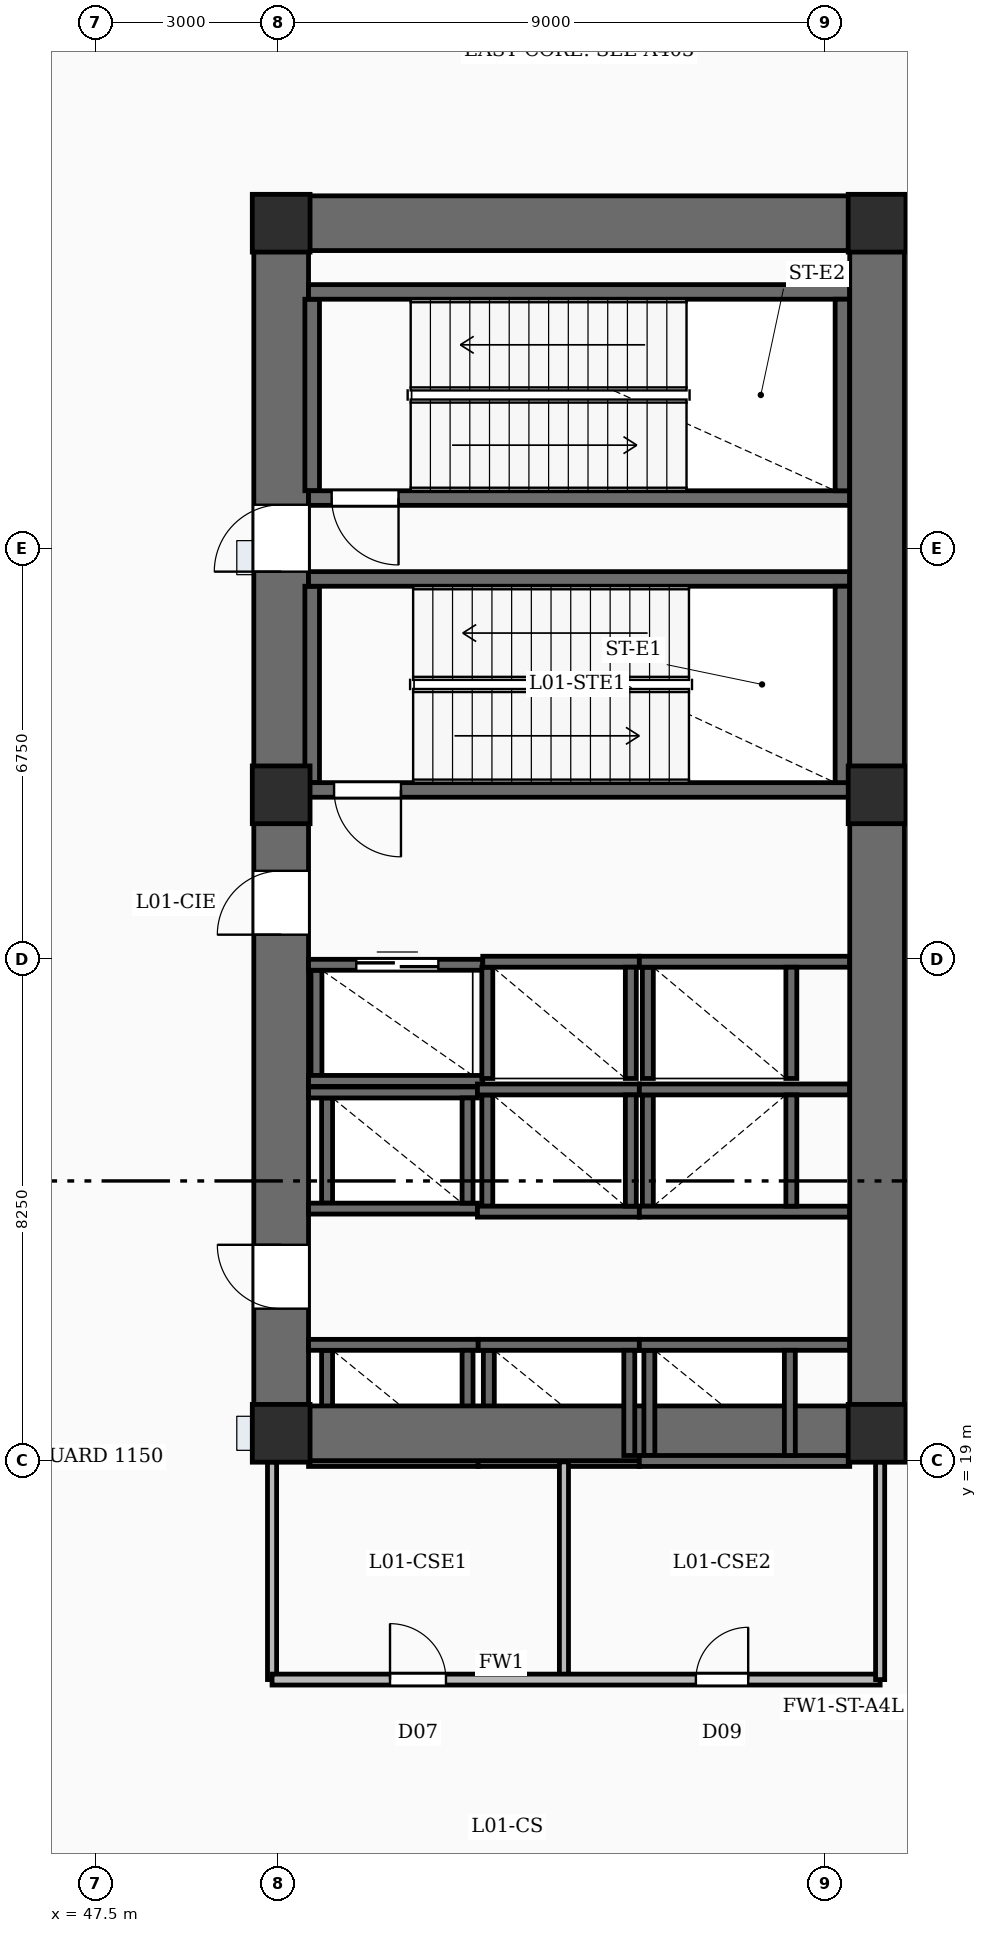
"""IFC4 building model, lengths in metres.
Left out: names, types, materials, properties, quantities, classifications, styles, units other than length and angle.
Written with IfcOpenShell. Run it as: python <this file> out.ifc"""

import sys

from ifc_helpers import new_model, si_unit, direction, frame, frame_2d, origin, origin_2d, place, context, subcontext, project, spatial, rectangle, extrude, element, fill, save


model = new_model("IFC4")
c1 = context("Model", 3, precision=1e-05, world=origin(), true_north=direction((0.0, 1.0)))
c2 = subcontext(c1, "Body", "Model", "MODEL_VIEW")
j1 = project(units=[si_unit("LENGTHUNIT", "METRE"), si_unit("PLANEANGLEUNIT", "RADIAN")], contexts=[c1])
p1 = place(None, origin())
s1 = spatial("IfcSite", under=j1, at=p1, CompositionType="ELEMENT")
p2 = place(p1, origin())
s2 = spatial("IfcBuilding", under=s1, at=p2, CompositionType="ELEMENT")
p3 = place(p2, frame((0.0, 0.0, 8.0)))
s3 = spatial("IfcBuildingStorey", under=s2, at=p3, CompositionType="ELEMENT", Elevation=8.0)
p4 = place(p3, frame((50.55, 19.0, -0.35), z_axis=(0.0, 0.0, 1.0), x_axis=(0.0, 1.0, 0.0)))
e1 = element("IfcWall", 1, at=p4, inside=s3, PredefinedType="SHEAR", context=c2, shape_type="SweptSolid", body=[
    extrude(rectangle(XDim=20.8, YDim=0.9, at=frame_2d((10.4, 0.0))), origin(), (0.0, 0.0, 1.0), 5.0),
])
p5 = place(p4, frame((2.5, 0.0, 0.35)))
e2 = element("IfcOpeningElement", 2, at=p5, cuts=e1, PredefinedType="OPENING", context=c2, shape_type="SweptSolid", body=[
    extrude(rectangle(XDim=1.05, YDim=2.15, at=frame_2d((0.525, 1.075))), frame((0.0, 0.46, 0.0), z_axis=(0.0, -1.0, 0.0), x_axis=(1.0, 0.0, 0.0)), (0.0, 0.0, 1.0), 0.92),
])
p6 = place(p4, frame((8.65, 0.0, 0.35)))
e3 = element("IfcOpeningElement", 3, at=p6, cuts=e1, PredefinedType="OPENING", context=c2, shape_type="SweptSolid", body=[
    extrude(rectangle(XDim=1.05, YDim=2.15, at=frame_2d((0.525, 1.075))), frame((0.0, 0.46, 0.0), z_axis=(0.0, -1.0, 0.0), x_axis=(1.0, 0.0, 0.0)), (0.0, 0.0, 1.0), 0.92),
])
p7 = place(p4, frame((14.62, 0.0, 0.35)))
e4 = element("IfcOpeningElement", 4, at=p7, cuts=e1, PredefinedType="OPENING", context=c2, shape_type="SweptSolid", body=[
    extrude(rectangle(XDim=1.1, YDim=2.15, at=frame_2d((0.55, 1.075))), frame((0.0, 0.46, 0.0), z_axis=(0.0, -1.0, 0.0), x_axis=(1.0, 0.0, 0.0)), (0.0, 0.0, 1.0), 0.92),
])
p8 = place(p3, frame((60.35, 19.0, -0.35), z_axis=(0.0, 0.0, 1.0), x_axis=(0.0, 1.0, 0.0)))
e5 = element("IfcWall", 5, at=p8, inside=s3, PredefinedType="SHEAR", context=c2, shape_type="SweptSolid", body=[
    extrude(rectangle(XDim=20.8, YDim=0.9, at=frame_2d((10.4, 0.0))), origin(), (0.0, 0.0, 1.0), 5.0),
])
for number, where, z_axis, x_axis in (
    (6, (51.0, 19.45, -0.35), (0.0, 0.0, 1.0), (1.0, 0.0, 0.0)),
    (7, (51.0, 39.35, -0.35), (0.0, 0.0, 1.0), (1.0, 0.0, 0.0)),
):
    element("IfcWall", number, at=place(p3, frame(where, z_axis=z_axis, x_axis=x_axis)), inside=s3, PredefinedType="SHEAR", context=c2, shape_type="SweptSolid", body=[
        extrude(rectangle(XDim=8.9, YDim=0.9, at=frame_2d((4.45, 0.0))), origin(), (0.0, 0.0, 1.0), 5.0),
    ])
for number, where, z_axis, x_axis in (
    (8, (50.55, 19.45, -0.35), (0.0, 0.0, 1.0), (1.0, 0.0, 0.0)),
    (9, (60.35, 19.45, -0.35), (0.0, 0.0, 1.0), (1.0, 0.0, 0.0)),
    (10, (50.55, 29.95, -0.35), (0.0, 0.0, 1.0), (1.0, 0.0, 0.0)),
    (11, (60.35, 29.95, -0.35), (0.0, 0.0, 1.0), (1.0, 0.0, 0.0)),
    (12, (50.55, 39.35, -0.35), (0.0, 0.0, 1.0), (1.0, 0.0, 0.0)),
    (13, (60.35, 39.35, -0.35), (0.0, 0.0, 1.0), (1.0, 0.0, 0.0)),
):
    element("IfcColumn", number, at=place(p3, frame(where, z_axis=z_axis, x_axis=x_axis)), inside=s3, PredefinedType="COLUMN", context=c2, shape_type="SweptSolid", body=[
        extrude(rectangle(XDim=0.95, YDim=0.95, at=origin_2d()), origin(), (0.0, 0.0, 1.0), 5.0),
    ])
p9 = place(p3, frame((59.9, 30.03, 0.0), z_axis=(0.0, 0.0, 1.0), x_axis=(-1.0, 0.0, 0.0)))
e14 = element("IfcWall", 14, at=p9, inside=s3, PredefinedType="SOLIDWALL", context=c2, shape_type="SweptSolid", body=[
    extrude(rectangle(XDim=8.9, YDim=0.24, at=frame_2d((4.45, 0.0))), origin(), (0.0, 0.0, 1.0), 4.65),
])
p10 = place(p9, frame((7.38, 0.0, 0.0)))
e15 = element("IfcOpeningElement", 15, at=p10, cuts=e14, PredefinedType="OPENING", context=c2, shape_type="SweptSolid", body=[
    extrude(rectangle(XDim=1.1, YDim=2.15, at=frame_2d((0.55, 1.075))), frame((0.0, 0.13, 0.0), z_axis=(0.0, -1.0, 0.0), x_axis=(1.0, 0.0, 0.0)), (0.0, 0.0, 1.0), 0.26),
])
p11 = place(p3, frame((51.0, 33.5, 0.0), z_axis=(0.0, 0.0, 1.0), x_axis=(1.0, 0.0, 0.0)))
e16 = element("IfcWall", 16, at=p11, inside=s3, PredefinedType="SOLIDWALL", context=c2, shape_type="SweptSolid", body=[
    extrude(rectangle(XDim=8.9, YDim=0.24, at=frame_2d((4.45, 0.0))), origin(), (0.0, 0.0, 1.0), 4.65),
])
for number, where, z_axis, x_axis in (
    (17, (51.06, 30.15, 0.0), (0.0, 0.0, 1.0), (0.0, 1.0, 0.0)),
    (18, (59.78, 30.15, 0.0), (0.0, 0.0, 1.0), (0.0, 1.0, 0.0)),
):
    element("IfcWall", number, at=place(p3, frame(where, z_axis=z_axis, x_axis=x_axis)), inside=s3, PredefinedType="SOLIDWALL", context=c2, shape_type="SweptSolid", body=[
        extrude(rectangle(XDim=3.23, YDim=0.24, at=frame_2d((1.615, 0.0))), origin(), (0.0, 0.0, 1.0), 4.65),
    ])
p12 = place(p3, frame((59.9, 34.83, 0.0), z_axis=(0.0, 0.0, 1.0), x_axis=(-1.0, 0.0, 0.0)))
e19 = element("IfcWall", 19, at=p12, inside=s3, PredefinedType="SOLIDWALL", context=c2, shape_type="SweptSolid", body=[
    extrude(rectangle(XDim=8.9, YDim=0.24, at=frame_2d((4.45, 0.0))), origin(), (0.0, 0.0, 1.0), 4.65),
])
p13 = place(p12, frame((7.42, 0.0, 0.0)))
e20 = element("IfcOpeningElement", 20, at=p13, cuts=e19, PredefinedType="OPENING", context=c2, shape_type="SweptSolid", body=[
    extrude(rectangle(XDim=1.1, YDim=2.15, at=frame_2d((0.55, 1.075))), frame((0.0, 0.13, 0.0), z_axis=(0.0, -1.0, 0.0), x_axis=(1.0, 0.0, 0.0)), (0.0, 0.0, 1.0), 0.26),
])
p14 = place(p3, frame((51.0, 38.22, 0.0), z_axis=(0.0, 0.0, 1.0), x_axis=(1.0, 0.0, 0.0)))
e21 = element("IfcWall", 21, at=p14, inside=s3, PredefinedType="SOLIDWALL", context=c2, shape_type="SweptSolid", body=[
    extrude(rectangle(XDim=8.9, YDim=0.24, at=frame_2d((4.45, 0.0))), origin(), (0.0, 0.0, 1.0), 4.65),
])
for number, where, z_axis, x_axis in (
    (22, (51.06, 34.95, 0.0), (0.0, 0.0, 1.0), (0.0, 1.0, 0.0)),
    (23, (59.78, 34.95, 0.0), (0.0, 0.0, 1.0), (0.0, 1.0, 0.0)),
):
    element("IfcWall", number, at=place(p3, frame(where, z_axis=z_axis, x_axis=x_axis)), inside=s3, PredefinedType="SOLIDWALL", context=c2, shape_type="SweptSolid", body=[
        extrude(rectangle(XDim=3.15, YDim=0.24, at=frame_2d((1.575, 0.0))), origin(), (0.0, 0.0, 1.0), 4.65),
    ])
for number, where, z_axis, x_axis in (
    (24, (51.0, 20.905, 0.0), (0.0, 0.0, 1.0), (1.0, 0.0, 0.0)),
    (25, (51.0, 18.995, 0.0), (0.0, 0.0, 1.0), (1.0, 0.0, 0.0)),
):
    element("IfcWall", number, at=place(p3, frame(where, z_axis=z_axis, x_axis=x_axis)), inside=s3, PredefinedType="SOLIDWALL", context=c2, shape_type="SweptSolid", body=[
        extrude(rectangle(XDim=2.79, YDim=0.18, at=frame_2d((1.395, 0.0))), origin(), (0.0, 0.0, 1.0), 4.65),
    ])
for number, where, z_axis, x_axis in (
    (26, (51.305, 19.085, 0.0), (0.0, 0.0, 1.0), (0.0, 1.0, 0.0)),
    (27, (53.615, 19.085, 0.0), (0.0, 0.0, 1.0), (0.0, 1.0, 0.0)),
):
    element("IfcWall", number, at=place(p3, frame(where, z_axis=z_axis, x_axis=x_axis)), inside=s3, PredefinedType="SOLIDWALL", context=c2, shape_type="SweptSolid", body=[
        extrude(rectangle(XDim=1.73, YDim=0.18, at=frame_2d((0.865, 0.0))), origin(), (0.0, 0.0, 1.0), 4.65),
    ])
for number, where, z_axis, x_axis in (
    (28, (53.79, 20.905, 0.0), (0.0, 0.0, 1.0), (1.0, 0.0, 0.0)),
    (29, (53.79, 18.995, 0.0), (0.0, 0.0, 1.0), (1.0, 0.0, 0.0)),
):
    element("IfcWall", number, at=place(p3, frame(where, z_axis=z_axis, x_axis=x_axis)), inside=s3, PredefinedType="SOLIDWALL", context=c2, shape_type="SweptSolid", body=[
        extrude(rectangle(XDim=2.65, YDim=0.18, at=frame_2d((1.325, 0.0))), origin(), (0.0, 0.0, 1.0), 4.65),
    ])
for number, where, z_axis, x_axis in (
    (30, (53.965, 19.085, 0.0), (0.0, 0.0, 1.0), (0.0, 1.0, 0.0)),
    (31, (56.275, 19.085, 0.0), (0.0, 0.0, 1.0), (0.0, 1.0, 0.0)),
):
    element("IfcWall", number, at=place(p3, frame(where, z_axis=z_axis, x_axis=x_axis)), inside=s3, PredefinedType="SOLIDWALL", context=c2, shape_type="SweptSolid", body=[
        extrude(rectangle(XDim=1.73, YDim=0.18, at=frame_2d((0.865, 0.0))), origin(), (0.0, 0.0, 1.0), 4.65),
    ])
for number, where, z_axis, x_axis in (
    (32, (56.44, 20.905, 0.0), (0.0, 0.0, 1.0), (1.0, 0.0, 0.0)),
    (33, (56.44, 18.995, 0.0), (0.0, 0.0, 1.0), (1.0, 0.0, 0.0)),
):
    element("IfcWall", number, at=place(p3, frame(where, z_axis=z_axis, x_axis=x_axis)), inside=s3, PredefinedType="SOLIDWALL", context=c2, shape_type="SweptSolid", body=[
        extrude(rectangle(XDim=3.46, YDim=0.18, at=frame_2d((1.73, 0.0))), origin(), (0.0, 0.0, 1.0), 4.65),
    ])
for number, where, z_axis, x_axis in (
    (34, (56.605, 19.085, 0.0), (0.0, 0.0, 1.0), (0.0, 1.0, 0.0)),
    (35, (58.915, 19.085, 0.0), (0.0, 0.0, 1.0), (0.0, 1.0, 0.0)),
):
    element("IfcWall", number, at=place(p3, frame(where, z_axis=z_axis, x_axis=x_axis)), inside=s3, PredefinedType="SOLIDWALL", context=c2, shape_type="SweptSolid", body=[
        extrude(rectangle(XDim=1.73, YDim=0.18, at=frame_2d((0.865, 0.0))), origin(), (0.0, 0.0, 1.0), 4.65),
    ])
for number, where, z_axis, x_axis in (
    (36, (51.0, 25.055, 0.0), (0.0, 0.0, 1.0), (1.0, 0.0, 0.0)),
    (37, (51.0, 23.145, 0.0), (0.0, 0.0, 1.0), (1.0, 0.0, 0.0)),
):
    element("IfcWall", number, at=place(p3, frame(where, z_axis=z_axis, x_axis=x_axis)), inside=s3, PredefinedType="SOLIDWALL", context=c2, shape_type="SweptSolid", body=[
        extrude(rectangle(XDim=2.778, YDim=0.18, at=frame_2d((1.389, 0.0))), origin(), (0.0, 0.0, 1.0), 4.65),
    ])
for number, where, z_axis, x_axis in (
    (38, (51.305, 23.235, 0.0), (0.0, 0.0, 1.0), (0.0, 1.0, 0.0)),
    (39, (53.615, 23.235, 0.0), (0.0, 0.0, 1.0), (0.0, 1.0, 0.0)),
):
    element("IfcWall", number, at=place(p3, frame(where, z_axis=z_axis, x_axis=x_axis)), inside=s3, PredefinedType="SOLIDWALL", context=c2, shape_type="SweptSolid", body=[
        extrude(rectangle(XDim=1.73, YDim=0.18, at=frame_2d((0.865, 0.0))), origin(), (0.0, 0.0, 1.0), 4.65),
    ])
for number, where, z_axis, x_axis in (
    (40, (53.778, 25.105, 0.0), (0.0, 0.0, 1.0), (1.0, 0.0, 0.0)),
    (41, (53.778, 23.095, 0.0), (0.0, 0.0, 1.0), (1.0, 0.0, 0.0)),
):
    element("IfcWall", number, at=place(p3, frame(where, z_axis=z_axis, x_axis=x_axis)), inside=s3, PredefinedType="SOLIDWALL", context=c2, shape_type="SweptSolid", body=[
        extrude(rectangle(XDim=2.662, YDim=0.18, at=frame_2d((1.331, 0.0))), origin(), (0.0, 0.0, 1.0), 4.65),
    ])
for number, where, z_axis, x_axis in (
    (42, (53.94, 23.185, 0.0), (0.0, 0.0, 1.0), (0.0, 1.0, 0.0)),
    (43, (56.3, 23.185, 0.0), (0.0, 0.0, 1.0), (0.0, 1.0, 0.0)),
):
    element("IfcWall", number, at=place(p3, frame(where, z_axis=z_axis, x_axis=x_axis)), inside=s3, PredefinedType="SOLIDWALL", context=c2, shape_type="SweptSolid", body=[
        extrude(rectangle(XDim=1.83, YDim=0.18, at=frame_2d((0.915, 0.0))), origin(), (0.0, 0.0, 1.0), 4.65),
    ])
for number, where, z_axis, x_axis in (
    (44, (56.44, 25.105, 0.0), (0.0, 0.0, 1.0), (1.0, 0.0, 0.0)),
    (45, (56.44, 23.095, 0.0), (0.0, 0.0, 1.0), (1.0, 0.0, 0.0)),
):
    element("IfcWall", number, at=place(p3, frame(where, z_axis=z_axis, x_axis=x_axis)), inside=s3, PredefinedType="SOLIDWALL", context=c2, shape_type="SweptSolid", body=[
        extrude(rectangle(XDim=3.46, YDim=0.18, at=frame_2d((1.73, 0.0))), origin(), (0.0, 0.0, 1.0), 4.65),
    ])
for number, where, z_axis, x_axis in (
    (46, (56.58, 23.185, 0.0), (0.0, 0.0, 1.0), (0.0, 1.0, 0.0)),
    (47, (58.94, 23.185, 0.0), (0.0, 0.0, 1.0), (0.0, 1.0, 0.0)),
):
    element("IfcWall", number, at=place(p3, frame(where, z_axis=z_axis, x_axis=x_axis)), inside=s3, PredefinedType="SOLIDWALL", context=c2, shape_type="SweptSolid", body=[
        extrude(rectangle(XDim=1.83, YDim=0.18, at=frame_2d((0.915, 0.0))), origin(), (0.0, 0.0, 1.0), 4.65),
    ])
p15 = place(p3, frame((53.865, 27.205, 0.0), z_axis=(0.0, 0.0, 1.0), x_axis=(1.0, 0.0, 0.0)))
e48 = element("IfcWall", 48, at=p15, inside=s3, PredefinedType="SOLIDWALL", context=c2, shape_type="SweptSolid", body=[
    extrude(rectangle(XDim=2.575, YDim=0.18, at=frame_2d((1.288, 0.0))), origin(), (0.0, 0.0, 1.0), 4.65),
])
for number, where, z_axis, x_axis in (
    (49, (53.94, 25.285, 0.0), (0.0, 0.0, 1.0), (0.0, 1.0, 0.0)),
    (50, (56.3, 25.285, 0.0), (0.0, 0.0, 1.0), (0.0, 1.0, 0.0)),
):
    element("IfcWall", number, at=place(p3, frame(where, z_axis=z_axis, x_axis=x_axis)), inside=s3, PredefinedType="SOLIDWALL", context=c2, shape_type="SweptSolid", body=[
        extrude(rectangle(XDim=1.83, YDim=0.18, at=frame_2d((0.915, 0.0))), origin(), (0.0, 0.0, 1.0), 4.65),
    ])
p16 = place(p3, frame((56.44, 27.205, 0.0), z_axis=(0.0, 0.0, 1.0), x_axis=(1.0, 0.0, 0.0)))
e51 = element("IfcWall", 51, at=p16, inside=s3, PredefinedType="SOLIDWALL", context=c2, shape_type="SweptSolid", body=[
    extrude(rectangle(XDim=3.46, YDim=0.18, at=frame_2d((1.73, 0.0))), origin(), (0.0, 0.0, 1.0), 4.65),
])
for number, where, z_axis, x_axis in (
    (52, (56.58, 25.285, 0.0), (0.0, 0.0, 1.0), (0.0, 1.0, 0.0)),
    (53, (58.94, 25.285, 0.0), (0.0, 0.0, 1.0), (0.0, 1.0, 0.0)),
):
    element("IfcWall", number, at=place(p3, frame(where, z_axis=z_axis, x_axis=x_axis)), inside=s3, PredefinedType="SOLIDWALL", context=c2, shape_type="SweptSolid", body=[
        extrude(rectangle(XDim=1.83, YDim=0.18, at=frame_2d((0.915, 0.0))), origin(), (0.0, 0.0, 1.0), 4.65),
    ])
p17 = place(p3, frame((51.0, 27.155, 0.0), z_axis=(0.0, 0.0, 1.0), x_axis=(1.0, 0.0, 0.0)))
e54 = element("IfcWall", 54, at=p17, inside=s3, PredefinedType="SOLIDWALL", context=c2, shape_type="SweptSolid", body=[
    extrude(rectangle(XDim=2.865, YDim=0.18, at=frame_2d((1.433, 0.0))), origin(), (0.0, 0.0, 1.0), 4.65),
])
p18 = place(p17, frame((0.785, 0.0, 0.0)))
e55 = element("IfcOpeningElement", 55, at=p18, cuts=e54, PredefinedType="OPENING", context=c2, shape_type="SweptSolid", body=[
    extrude(rectangle(XDim=1.35, YDim=2.3, at=frame_2d((0.675, 1.15))), frame((0.0, 0.1, 0.0), z_axis=(0.0, -1.0, 0.0), x_axis=(1.0, 0.0, 0.0)), (0.0, 0.0, 1.0), 0.2),
])
p19 = place(p3, frame((51.0, 25.245, 0.0), z_axis=(0.0, 0.0, 1.0), x_axis=(1.0, 0.0, 0.0)))
e56 = element("IfcWall", 56, at=p19, inside=s3, PredefinedType="SOLIDWALL", context=c2, shape_type="SweptSolid", body=[
    extrude(rectangle(XDim=2.865, YDim=0.18, at=frame_2d((1.433, 0.0))), origin(), (0.0, 0.0, 1.0), 4.65),
])
p20 = place(p3, frame((51.13, 25.335, 0.0), z_axis=(0.0, 0.0, 1.0), x_axis=(0.0, 1.0, 0.0)))
e57 = element("IfcWall", 57, at=p20, inside=s3, PredefinedType="SOLIDWALL", context=c2, shape_type="SweptSolid", body=[
    extrude(rectangle(XDim=1.73, YDim=0.18, at=frame_2d((0.865, 0.0))), origin(), (0.0, 0.0, 1.0), 4.65),
])
p21 = place(p3, frame((55.2, 15.4, 0.0), z_axis=(0.0, 0.0, 1.0), x_axis=(0.0, 1.0, 0.0)))
e58 = element("IfcWall", 58, at=p21, inside=s3, PredefinedType="PARTITIONING", context=c2, shape_type="SweptSolid", body=[
    extrude(rectangle(XDim=3.58, YDim=0.15, at=frame_2d((1.79, 0.0))), origin(), (0.0, 0.0, 1.0), 3.71),
])
p22 = place(p3, frame((50.4, 15.4, 0.0), z_axis=(0.0, 0.0, 1.0), x_axis=(1.0, 0.0, 0.0)))
e59 = element("IfcWall", 59, at=p22, inside=s3, PredefinedType="SOLIDWALL", context=c2, shape_type="SweptSolid", body=[
    extrude(rectangle(XDim=10.0, YDim=0.18, at=frame_2d((5.0, 0.0))), origin(), (0.0, 0.0, 1.0), 3.71),
])
p23 = place(p22, frame((1.94, 0.0, 0.0)))
e60 = element("IfcOpeningElement", 60, at=p23, cuts=e59, PredefinedType="OPENING", context=c2, shape_type="SweptSolid", body=[
    extrude(rectangle(XDim=0.92, YDim=2.1, at=frame_2d((0.46, 1.05))), frame((0.0, 0.1, 0.0), z_axis=(0.0, -1.0, 0.0), x_axis=(1.0, 0.0, 0.0)), (0.0, 0.0, 1.0), 0.2),
])
p24 = place(p22, frame((6.97, 0.0, 0.0)))
e61 = element("IfcOpeningElement", 61, at=p24, cuts=e59, PredefinedType="OPENING", context=c2, shape_type="SweptSolid", body=[
    extrude(rectangle(XDim=0.86, YDim=2.05, at=frame_2d((0.43, 1.025))), frame((0.0, 0.1, 0.0), z_axis=(0.0, -1.0, 0.0), x_axis=(1.0, 0.0, 0.0)), (0.0, 0.0, 1.0), 0.2),
])
for number, where, z_axis, x_axis in (
    (62, (50.4, 15.4, 0.0), (0.0, 0.0, 1.0), (0.0, 1.0, 0.0)),
    (63, (60.4, 15.4, 0.0), (0.0, 0.0, 1.0), (0.0, 1.0, 0.0)),
):
    element("IfcWall", number, at=place(p3, frame(where, z_axis=z_axis, x_axis=x_axis)), inside=s3, PredefinedType="PARTITIONING", context=c2, shape_type="SweptSolid", body=[
        extrude(rectangle(XDim=3.58, YDim=0.15, at=frame_2d((1.79, 0.0))), origin(), (0.0, 0.0, 1.0), 3.71),
    ])
p25 = place(p5, origin())
e64 = element("IfcDoor", 64, at=p25, inside=s3, OperationType="SINGLE_SWING_RIGHT", PredefinedType="DOOR", context=c2, shape_type="SweptSolid", body=[
    extrude(rectangle(XDim=1.05, YDim=2.15, at=frame_2d((0.525, 1.075))), frame((0.0, 0.025, 0.0), z_axis=(0.0, -1.0, 0.0), x_axis=(1.0, 0.0, 0.0)), (0.0, 0.0, 1.0), 0.05),
])
fill(e2, e64)
p26 = place(p6, origin())
e65 = element("IfcDoor", 65, at=p26, inside=s3, OperationType="SINGLE_SWING_LEFT", PredefinedType="DOOR", context=c2, shape_type="SweptSolid", body=[
    extrude(rectangle(XDim=1.05, YDim=2.15, at=frame_2d((0.525, 1.075))), frame((0.0, 0.025, 0.0), z_axis=(0.0, -1.0, 0.0), x_axis=(1.0, 0.0, 0.0)), (0.0, 0.0, 1.0), 0.05),
])
fill(e3, e65)
p27 = place(p7, origin())
e66 = element("IfcDoor", 66, at=p27, inside=s3, OperationType="SINGLE_SWING_LEFT", PredefinedType="DOOR", context=c2, shape_type="SweptSolid", body=[
    extrude(rectangle(XDim=1.1, YDim=2.15, at=frame_2d((0.55, 1.075))), frame((0.0, 0.025, 0.0), z_axis=(0.0, -1.0, 0.0), x_axis=(1.0, 0.0, 0.0)), (0.0, 0.0, 1.0), 0.05),
])
fill(e4, e66)
p28 = place(p10, origin())
e67 = element("IfcDoor", 67, at=p28, inside=s3, OperationType="SINGLE_SWING_LEFT", PredefinedType="DOOR", context=c2, shape_type="SweptSolid", body=[
    extrude(rectangle(XDim=1.1, YDim=2.15, at=frame_2d((0.55, 1.075))), frame((0.0, 0.025, 0.0), z_axis=(0.0, -1.0, 0.0), x_axis=(1.0, 0.0, 0.0)), (0.0, 0.0, 1.0), 0.05),
])
fill(e15, e67)
p29 = place(p13, origin())
e68 = element("IfcDoor", 68, at=p29, inside=s3, OperationType="SINGLE_SWING_LEFT", PredefinedType="DOOR", context=c2, shape_type="SweptSolid", body=[
    extrude(rectangle(XDim=1.1, YDim=2.15, at=frame_2d((0.55, 1.075))), frame((0.0, 0.025, 0.0), z_axis=(0.0, -1.0, 0.0), x_axis=(1.0, 0.0, 0.0)), (0.0, 0.0, 1.0), 0.05),
])
fill(e20, e68)
p30 = place(p18, origin())
e69 = element("IfcDoor", 69, at=p30, inside=s3, OperationType="DOUBLE_DOOR_SLIDING", PredefinedType="DOOR", context=c2, shape_type="SweptSolid", body=[
    extrude(rectangle(XDim=1.35, YDim=2.3, at=frame_2d((0.675, 1.15))), frame((0.0, 0.025, 0.0), z_axis=(0.0, -1.0, 0.0), x_axis=(1.0, 0.0, 0.0)), (0.0, 0.0, 1.0), 0.05),
])
fill(e55, e69)
p31 = place(p23, origin())
e70 = element("IfcDoor", 70, at=p31, inside=s3, OperationType="SINGLE_SWING_LEFT", PredefinedType="DOOR", context=c2, shape_type="SweptSolid", body=[
    extrude(rectangle(XDim=0.92, YDim=2.1, at=frame_2d((0.46, 1.05))), frame((0.0, 0.025, 0.0), z_axis=(0.0, -1.0, 0.0), x_axis=(1.0, 0.0, 0.0)), (0.0, 0.0, 1.0), 0.05),
])
fill(e60, e70)
p32 = place(p24, origin())
e71 = element("IfcDoor", 71, at=p32, inside=s3, OperationType="SINGLE_SWING_RIGHT", PredefinedType="DOOR", context=c2, shape_type="SweptSolid", body=[
    extrude(rectangle(XDim=0.86, YDim=2.05, at=frame_2d((0.43, 1.025))), frame((0.0, 0.025, 0.0), z_axis=(0.0, -1.0, 0.0), x_axis=(1.0, 0.0, 0.0)), (0.0, 0.0, 1.0), 0.05),
])
fill(e61, e71)
save(model, sys.argv[1])
